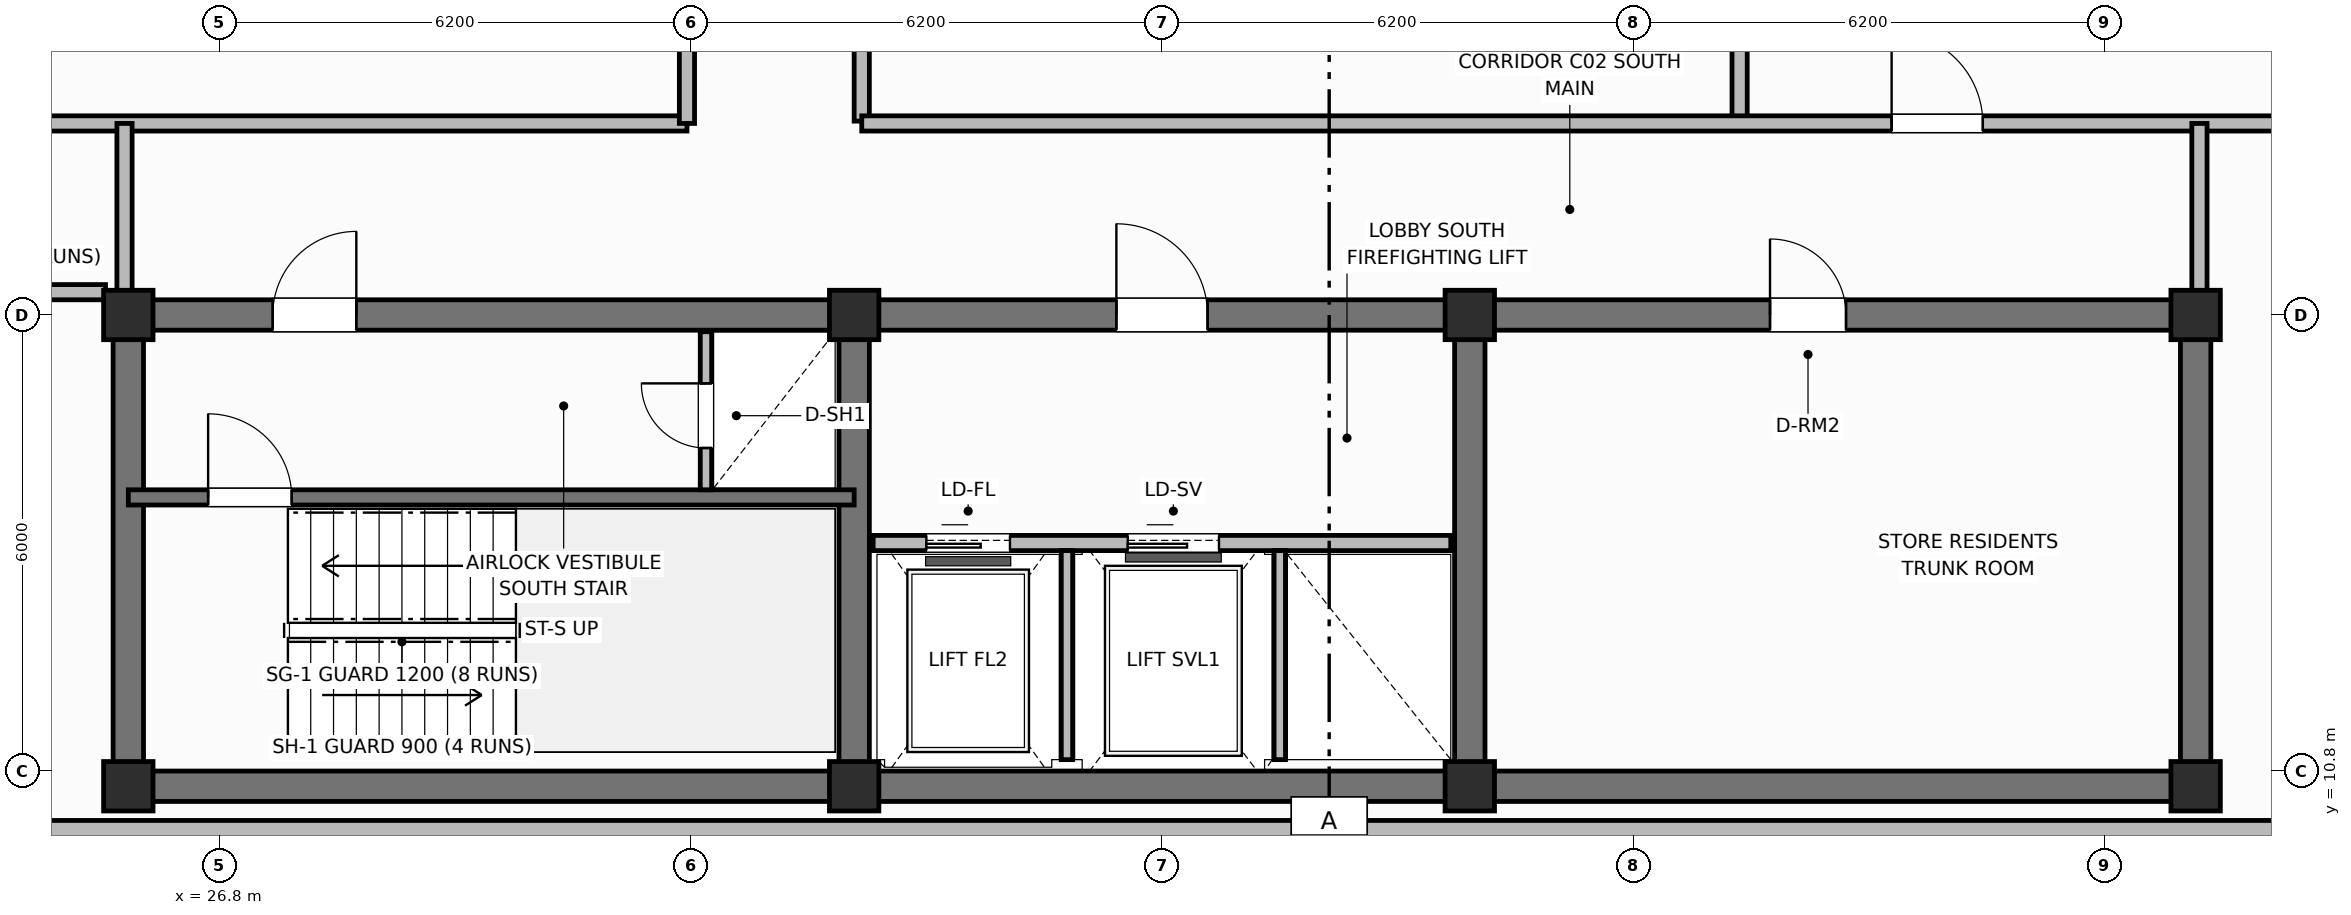
"""IFC4 building model, lengths in metres.
Left out: names, types, materials, properties, quantities, classifications, styles, units other than length and angle.
Written with IfcOpenShell. Run it as: python <this file> out.ifc"""

import sys

from ifc_helpers import new_model, si_unit, direction, frame, frame_2d, origin, origin_2d, place, context, subcontext, project, spatial, rectangle, extrude, element, fill, save


model = new_model("IFC4")
c1 = context("Model", 3, precision=1e-05, world=origin(), true_north=direction((0.0, 1.0)))
c2 = subcontext(c1, "Body", "Model", "MODEL_VIEW")
j1 = project(units=[si_unit("LENGTHUNIT", "METRE"), si_unit("PLANEANGLEUNIT", "RADIAN")], contexts=[c1])
p1 = place(None, origin())
s1 = spatial("IfcSite", under=j1, at=p1, CompositionType="ELEMENT")
p2 = place(p1, origin())
s2 = spatial("IfcBuilding", under=s1, at=p2, CompositionType="ELEMENT")
p3 = place(p2, frame((0.0, 0.0, 305.6)))
s3 = spatial("IfcBuildingStorey", under=s2, at=p3, CompositionType="ELEMENT", Elevation=305.6)
p4 = place(p3, frame((52.8, 10.6, 0.0), z_axis=(0.0, 0.0, 1.0), x_axis=(-1.0, 0.0, 0.0)))
e1 = element("IfcWall", 1, at=p4, inside=s3, PredefinedType="SHEAR", context=c2, shape_type="SweptSolid", body=[
    extrude(rectangle(XDim=27.2, YDim=0.4, at=frame_2d((13.6, 0.0))), origin(), (0.0, 0.0, 1.0), 3.6),
])
for number, where, z_axis, x_axis in (
    (2, (25.6, 10.8, 0.0), (0.0, 0.0, 1.0), (0.0, 1.0, 0.0)),
    (3, (52.8, 10.8, 0.0), (0.0, 0.0, 1.0), (0.0, 1.0, 0.0)),
):
    element("IfcWall", number, at=place(p3, frame(where, z_axis=z_axis, x_axis=x_axis)), inside=s3, PredefinedType="SHEAR", context=c2, shape_type="SweptSolid", body=[
        extrude(rectangle(XDim=5.8, YDim=0.4, at=frame_2d((2.9, 0.0))), origin(), (0.0, 0.0, 1.0), 3.6),
    ])
p5 = place(p3, frame((25.6, 16.8, 0.0), z_axis=(0.0, 0.0, 1.0), x_axis=(1.0, 0.0, 0.0)))
e4 = element("IfcWall", 4, at=p5, inside=s3, PredefinedType="SHEAR", context=c2, shape_type="SweptSolid", body=[
    extrude(rectangle(XDim=27.2, YDim=0.4, at=frame_2d((13.6, 0.0))), origin(), (0.0, 0.0, 1.0), 3.6),
])
p6 = place(p5, frame((1.9, 0.0, 0.0)))
e5 = element("IfcOpeningElement", 5, at=p6, cuts=e4, PredefinedType="OPENING", context=c2, shape_type="SweptSolid", body=[
    extrude(rectangle(XDim=1.1, YDim=2.15, at=frame_2d((0.55, 1.075))), frame((0.0, 0.21, 0.0), z_axis=(0.0, -1.0, 0.0), x_axis=(1.0, 0.0, 0.0)), (0.0, 0.0, 1.0), 0.42),
])
p7 = place(p5, frame((13.0, 0.0, 0.0)))
e6 = element("IfcOpeningElement", 6, at=p7, cuts=e4, PredefinedType="OPENING", context=c2, shape_type="SweptSolid", body=[
    extrude(rectangle(XDim=1.2, YDim=2.15, at=frame_2d((0.6, 1.075))), frame((0.0, 0.21, 0.0), z_axis=(0.0, -1.0, 0.0), x_axis=(1.0, 0.0, 0.0)), (0.0, 0.0, 1.0), 0.42),
])
p8 = place(p5, frame((21.6, 0.0, 0.0)))
e7 = element("IfcOpeningElement", 7, at=p8, cuts=e4, PredefinedType="OPENING", context=c2, shape_type="SweptSolid", body=[
    extrude(rectangle(XDim=1.0, YDim=2.15, at=frame_2d((0.5, 1.075))), frame((0.0, 0.21, 0.0), z_axis=(0.0, -1.0, 0.0), x_axis=(1.0, 0.0, 0.0)), (0.0, 0.0, 1.0), 0.42),
])
for number, where, z_axis, x_axis in (
    (8, (35.15, 10.8, 0.0), (0.0, 0.0, 1.0), (0.0, 1.0, 0.0)),
    (9, (43.25, 10.8, 0.0), (0.0, 0.0, 1.0), (0.0, 1.0, 0.0)),
):
    element("IfcWall", number, at=place(p3, frame(where, z_axis=z_axis, x_axis=x_axis)), inside=s3, PredefinedType="SHEAR", context=c2, shape_type="SweptSolid", body=[
        extrude(rectangle(XDim=5.8, YDim=0.4, at=frame_2d((2.9, 0.0))), origin(), (0.0, 0.0, 1.0), 3.6),
    ])
for number, where, z_axis, x_axis in (
    (10, (25.6, 10.6, 0.0), (0.0, 0.0, 1.0), (1.0, 0.0, 0.0)),
    (11, (25.6, 16.8, 0.0), (0.0, 0.0, 1.0), (1.0, 0.0, 0.0)),
    (12, (35.15, 10.6, 0.0), (0.0, 0.0, 1.0), (1.0, 0.0, 0.0)),
    (13, (35.15, 16.8, 0.0), (0.0, 0.0, 1.0), (1.0, 0.0, 0.0)),
    (14, (43.25, 10.6, 0.0), (0.0, 0.0, 1.0), (1.0, 0.0, 0.0)),
    (15, (43.25, 16.8, 0.0), (0.0, 0.0, 1.0), (1.0, 0.0, 0.0)),
    (16, (52.8, 10.6, 0.0), (0.0, 0.0, 1.0), (1.0, 0.0, 0.0)),
    (17, (52.8, 16.8, 0.0), (0.0, 0.0, 1.0), (1.0, 0.0, 0.0)),
):
    element("IfcColumn", number, at=place(p3, frame(where, z_axis=z_axis, x_axis=x_axis)), inside=s3, PredefinedType="COLUMN", context=c2, shape_type="SweptSolid", body=[
        extrude(rectangle(XDim=0.65, YDim=0.65, at=origin_2d()), origin(), (0.0, 0.0, 1.0), 3.6),
    ])
p9 = place(p3, frame((23.76, 10.0, 0.0), z_axis=(0.0, 0.0, 1.0), x_axis=(1.0, 0.0, 0.0)))
e18 = element("IfcWall", 18, at=p9, inside=s3, PredefinedType="SOLIDWALL", context=c2, shape_type="SweptSolid", body=[
    extrude(rectangle(XDim=30.88, YDim=0.3, at=frame_2d((15.44, 0.0))), origin(), (0.0, 0.0, 1.0), 2.84),
])
p10 = place(p3, frame((25.6, 14.4, 0.0), z_axis=(0.0, 0.0, 1.0), x_axis=(1.0, 0.0, 0.0)))
e19 = element("IfcWall", 19, at=p10, inside=s3, PredefinedType="SHEAR", context=c2, shape_type="SweptSolid", body=[
    extrude(rectangle(XDim=9.55, YDim=0.2, at=frame_2d((4.775, 0.0))), origin(), (0.0, 0.0, 1.0), 3.6),
])
p11 = place(p10, frame((1.05, 0.0, 0.0)))
e20 = element("IfcOpeningElement", 20, at=p11, cuts=e19, PredefinedType="OPENING", context=c2, shape_type="SweptSolid", body=[
    extrude(rectangle(XDim=1.1, YDim=2.15, at=frame_2d((0.55, 1.075))), frame((0.0, 0.11, 0.0), z_axis=(0.0, -1.0, 0.0), x_axis=(1.0, 0.0, 0.0)), (0.0, 0.0, 1.0), 0.22),
])
p12 = place(p3, frame((33.2, 14.5, 0.0), z_axis=(0.0, 0.0, 1.0), x_axis=(0.0, 1.0, 0.0)))
e21 = element("IfcWall", 21, at=p12, inside=s3, PredefinedType="PARTITIONING", context=c2, shape_type="SweptSolid", body=[
    extrude(rectangle(XDim=2.08, YDim=0.15, at=frame_2d((1.04, 0.0))), origin(), (0.0, 0.0, 1.0), 2.54),
])
p13 = place(p12, frame((0.55, 0.0, 0.0)))
e22 = element("IfcOpeningElement", 22, at=p13, cuts=e21, PredefinedType="OPENING", context=c2, shape_type="SweptSolid", body=[
    extrude(rectangle(XDim=0.85, YDim=2.05, at=frame_2d((0.425, 1.025))), frame((0.0, 0.085, 0.0), z_axis=(0.0, -1.0, 0.0), x_axis=(1.0, 0.0, 0.0)), (0.0, 0.0, 1.0), 0.17),
])
p14 = place(p3, frame((35.4, 13.8, 0.0), z_axis=(0.0, 0.0, 1.0), x_axis=(1.0, 0.0, 0.0)))
e23 = element("IfcWall", 23, at=p14, inside=s3, PredefinedType="PARTITIONING", context=c2, shape_type="SweptSolid", body=[
    extrude(rectangle(XDim=7.6, YDim=0.2, at=frame_2d((3.8, 0.0))), origin(), (0.0, 0.0, 1.0), 2.2),
])
p15 = place(p14, frame((0.7, 0.0, 0.0)))
e24 = element("IfcOpeningElement", 24, at=p15, cuts=e23, PredefinedType="OPENING", context=c2, shape_type="SweptSolid", body=[
    extrude(rectangle(XDim=1.1, YDim=2.15, at=frame_2d((0.55, 1.075))), frame((0.0, 0.11, 0.0), z_axis=(0.0, -1.0, 0.0), x_axis=(1.0, 0.0, 0.0)), (0.0, 0.0, 1.0), 0.22),
])
p16 = place(p14, frame((3.35, 0.0, 0.0)))
e25 = element("IfcOpeningElement", 25, at=p16, cuts=e23, PredefinedType="OPENING", context=c2, shape_type="SweptSolid", body=[
    extrude(rectangle(XDim=1.2, YDim=2.15, at=frame_2d((0.6, 1.075))), frame((0.0, 0.11, 0.0), z_axis=(0.0, -1.0, 0.0), x_axis=(1.0, 0.0, 0.0)), (0.0, 0.0, 1.0), 0.22),
])
for number, where, z_axis, x_axis in (
    (26, (37.95, 10.95, 0.0), (0.0, 0.0, 1.0), (0.0, 1.0, 0.0)),
    (27, (40.75, 10.95, 0.0), (0.0, 0.0, 1.0), (0.0, 1.0, 0.0)),
):
    element("IfcWall", number, at=place(p3, frame(where, z_axis=z_axis, x_axis=x_axis)), inside=s3, PredefinedType="PARTITIONING", context=c2, shape_type="SweptSolid", body=[
        extrude(rectangle(XDim=2.75, YDim=0.15, at=frame_2d((1.375, 0.0))), origin(), (0.0, 0.0, 1.0), 2.54),
    ])
p17 = place(p3, frame((21.53, 19.32, 0.0), z_axis=(0.0, 0.0, 1.0), x_axis=(1.0, 0.0, 0.0)))
e28 = element("IfcWall", 28, at=p17, inside=s3, PredefinedType="PARTITIONING", context=c2, shape_type="SweptSolid", body=[
    extrude(rectangle(XDim=11.42, YDim=0.2, at=frame_2d((5.71, 0.0))), origin(), (0.0, 0.0, 1.0), 2.54),
])
p18 = place(p3, frame((32.95, 19.32, 0.0), z_axis=(0.0, 0.0, 1.0), x_axis=(0.0, 1.0, 0.0)))
e29 = element("IfcWall", 29, at=p18, inside=s3, PredefinedType="PARTITIONING", context=c2, shape_type="SweptSolid", body=[
    extrude(rectangle(XDim=17.76, YDim=0.2, at=frame_2d((8.88, 0.0))), origin(), (0.0, 0.0, 1.0), 2.54),
])
p19 = place(p18, frame((6.0, 0.0, 0.0)))
e30 = element("IfcOpeningElement", 30, at=p19, cuts=e29, PredefinedType="OPENING", context=c2, shape_type="SweptSolid", body=[
    extrude(rectangle(XDim=1.2, YDim=2.15, at=frame_2d((0.6, 1.075))), frame((0.0, 0.11, 0.0), z_axis=(0.0, -1.0, 0.0), x_axis=(1.0, 0.0, 0.0)), (0.0, 0.0, 1.0), 0.22),
])
p20 = place(p3, frame((35.25, 19.35, 0.0), z_axis=(0.0, 0.0, 1.0), x_axis=(0.0, 1.0, 0.0)))
e31 = element("IfcWall", 31, at=p20, inside=s3, PredefinedType="PARTITIONING", context=c2, shape_type="SweptSolid", body=[
    extrude(rectangle(XDim=17.7, YDim=0.2, at=frame_2d((8.85, 0.0))), origin(), (0.0, 0.0, 1.0), 2.54),
])
p21 = place(p20, frame((6.0, 0.0, 0.0)))
e32 = element("IfcOpeningElement", 32, at=p21, cuts=e31, PredefinedType="OPENING", context=c2, shape_type="SweptSolid", body=[
    extrude(rectangle(XDim=1.2, YDim=2.15, at=frame_2d((0.6, 1.075))), frame((0.0, 0.11, 0.0), z_axis=(0.0, -1.0, 0.0), x_axis=(1.0, 0.0, 0.0)), (0.0, 0.0, 1.0), 0.22),
])
p22 = place(p3, frame((46.8, 19.35, 0.0), z_axis=(0.0, 0.0, 1.0), x_axis=(0.0, 1.0, 0.0)))
e33 = element("IfcWall", 33, at=p22, inside=s3, PredefinedType="PARTITIONING", context=c2, shape_type="SweptSolid", body=[
    extrude(rectangle(XDim=17.7, YDim=0.2, at=frame_2d((8.85, 0.0))), origin(), (0.0, 0.0, 1.0), 2.54),
])
p23 = place(p3, frame((35.25, 19.32, 0.0), z_axis=(0.0, 0.0, 1.0), x_axis=(1.0, 0.0, 0.0)))
e34 = element("IfcWall", 34, at=p23, inside=s3, PredefinedType="PARTITIONING", context=c2, shape_type="SweptSolid", body=[
    extrude(rectangle(XDim=21.62, YDim=0.2, at=frame_2d((10.81, 0.0))), origin(), (0.0, 0.0, 1.0), 2.54),
])
p24 = place(p23, frame((13.55, 0.0, 0.0)))
e35 = element("IfcOpeningElement", 35, at=p24, cuts=e34, PredefinedType="OPENING", context=c2, shape_type="SweptSolid", body=[
    extrude(rectangle(XDim=1.2, YDim=2.15, at=frame_2d((0.6, 1.075))), frame((0.0, 0.11, 0.0), z_axis=(0.0, -1.0, 0.0), x_axis=(1.0, 0.0, 0.0)), (0.0, 0.0, 1.0), 0.22),
])
for number, where, z_axis, x_axis in (
    (36, (52.85, 16.95, 0.0), (0.0, 0.0, 1.0), (0.0, 1.0, 0.0)),
    (37, (25.55, 16.95, 0.0), (0.0, 0.0, 1.0), (0.0, 1.0, 0.0)),
):
    element("IfcWall", number, at=place(p3, frame(where, z_axis=z_axis, x_axis=x_axis)), inside=s3, PredefinedType="PARTITIONING", context=c2, shape_type="SweptSolid", body=[
        extrude(rectangle(XDim=2.37, YDim=0.2, at=frame_2d((1.185, 0.0))), origin(), (0.0, 0.0, 1.0), 2.54),
    ])
p25 = place(p3, frame((21.53, 17.1, 0.0), z_axis=(0.0, 0.0, 1.0), x_axis=(1.0, 0.0, 0.0)))
e38 = element("IfcWall", 38, at=p25, inside=s3, PredefinedType="PARTITIONING", context=c2, shape_type="SweptSolid", body=[
    extrude(rectangle(XDim=3.77, YDim=0.2, at=frame_2d((1.885, 0.0))), origin(), (0.0, 0.0, 1.0), 2.54),
])
p26 = place(p11, origin())
e39 = element("IfcDoor", 39, at=p26, inside=s3, OperationType="SINGLE_SWING_LEFT", PredefinedType="DOOR", context=c2, shape_type="SweptSolid", body=[
    extrude(rectangle(XDim=1.1, YDim=2.15, at=frame_2d((0.55, 1.075))), frame((0.0, 0.025, 0.0), z_axis=(0.0, -1.0, 0.0), x_axis=(1.0, 0.0, 0.0)), (0.0, 0.0, 1.0), 0.05),
])
fill(e20, e39)
p27 = place(p13, origin())
e40 = element("IfcDoor", 40, at=p27, inside=s3, OperationType="SINGLE_SWING_RIGHT", PredefinedType="TRAPDOOR", context=c2, shape_type="SweptSolid", body=[
    extrude(rectangle(XDim=0.85, YDim=2.05, at=frame_2d((0.425, 1.025))), frame((0.0, 0.025, 0.0), z_axis=(0.0, -1.0, 0.0), x_axis=(1.0, 0.0, 0.0)), (0.0, 0.0, 1.0), 0.05),
])
fill(e22, e40)
p28 = place(p15, origin())
e41 = element("IfcDoor", 41, at=p28, inside=s3, OperationType="SLIDING_TO_LEFT", PredefinedType="DOOR", context=c2, shape_type="SweptSolid", body=[
    extrude(rectangle(XDim=1.1, YDim=2.15, at=frame_2d((0.55, 1.075))), frame((0.0, 0.025, 0.0), z_axis=(0.0, -1.0, 0.0), x_axis=(1.0, 0.0, 0.0)), (0.0, 0.0, 1.0), 0.05),
])
fill(e24, e41)
p29 = place(p16, origin())
e42 = element("IfcDoor", 42, at=p29, inside=s3, OperationType="SLIDING_TO_LEFT", PredefinedType="DOOR", context=c2, shape_type="SweptSolid", body=[
    extrude(rectangle(XDim=1.2, YDim=2.15, at=frame_2d((0.6, 1.075))), frame((0.0, 0.025, 0.0), z_axis=(0.0, -1.0, 0.0), x_axis=(1.0, 0.0, 0.0)), (0.0, 0.0, 1.0), 0.05),
])
fill(e25, e42)
p30 = place(p24, origin())
e43 = element("IfcDoor", 43, at=p30, inside=s3, OperationType="SINGLE_SWING_LEFT", PredefinedType="DOOR", context=c2, shape_type="SweptSolid", body=[
    extrude(rectangle(XDim=1.2, YDim=2.15, at=frame_2d((0.6, 1.075))), frame((0.0, 0.025, 0.0), z_axis=(0.0, -1.0, 0.0), x_axis=(1.0, 0.0, 0.0)), (0.0, 0.0, 1.0), 0.05),
])
fill(e35, e43)
p31 = place(p6, origin())
e44 = element("IfcDoor", 44, at=p31, inside=s3, OperationType="SINGLE_SWING_RIGHT", PredefinedType="DOOR", context=c2, shape_type="SweptSolid", body=[
    extrude(rectangle(XDim=1.1, YDim=2.15, at=frame_2d((0.55, 1.075))), frame((0.0, 0.025, 0.0), z_axis=(0.0, -1.0, 0.0), x_axis=(1.0, 0.0, 0.0)), (0.0, 0.0, 1.0), 0.05),
])
fill(e5, e44)
p32 = place(p7, origin())
e45 = element("IfcDoor", 45, at=p32, inside=s3, OperationType="SINGLE_SWING_LEFT", PredefinedType="DOOR", context=c2, shape_type="SweptSolid", body=[
    extrude(rectangle(XDim=1.2, YDim=2.15, at=frame_2d((0.6, 1.075))), frame((0.0, 0.025, 0.0), z_axis=(0.0, -1.0, 0.0), x_axis=(1.0, 0.0, 0.0)), (0.0, 0.0, 1.0), 0.05),
])
fill(e6, e45)
p33 = place(p8, origin())
e46 = element("IfcDoor", 46, at=p33, inside=s3, OperationType="SINGLE_SWING_LEFT", PredefinedType="DOOR", context=c2, shape_type="SweptSolid", body=[
    extrude(rectangle(XDim=1.0, YDim=2.15, at=frame_2d((0.5, 1.075))), frame((0.0, 0.025, 0.0), z_axis=(0.0, -1.0, 0.0), x_axis=(1.0, 0.0, 0.0)), (0.0, 0.0, 1.0), 0.05),
])
fill(e7, e46)
save(model, sys.argv[1])
